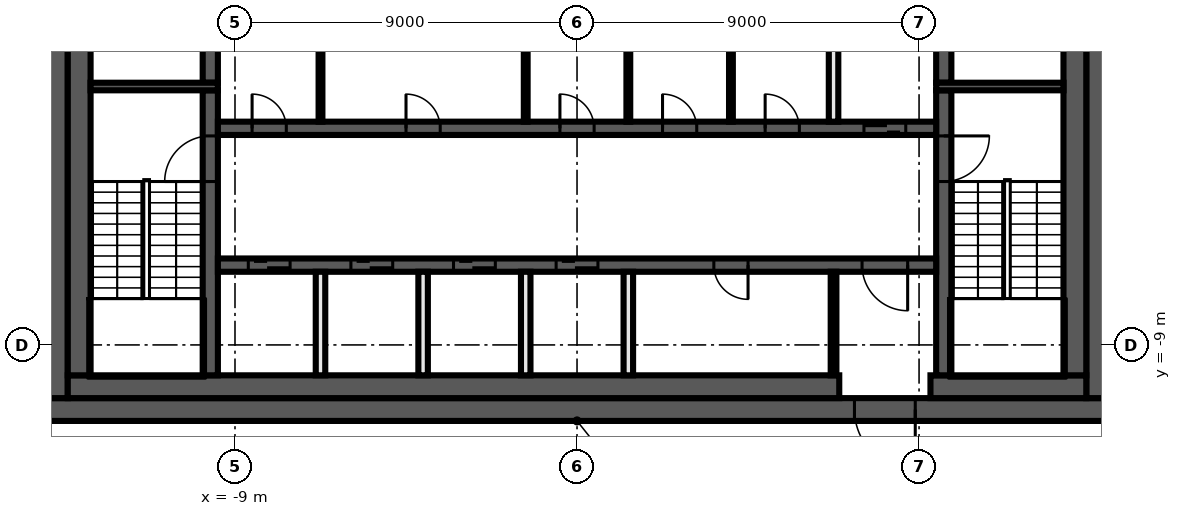
"""IFC4 building model, lengths in metres.
Left out: names, types, materials, properties, quantities, classifications, styles, units other than length and angle.
Written with IfcOpenShell. Run it as: python <this file> out.ifc"""

import sys

from ifc_helpers import new_model, si_unit, direction, frame, frame_2d, origin, place, context, subcontext, project, spatial, rectangle, extrude, element, fill, save


model = new_model("IFC4")
c1 = context("Model", 3, precision=1e-05, world=origin(), true_north=direction((0.0, 1.0)))
c2 = subcontext(c1, "Body", "Model", "MODEL_VIEW")
j1 = project(units=[si_unit("LENGTHUNIT", "METRE"), si_unit("PLANEANGLEUNIT", "RADIAN")], contexts=[c1])
p1 = place(None, origin())
s1 = spatial("IfcSite", under=j1, at=p1, CompositionType="ELEMENT")
p2 = place(p1, origin())
s2 = spatial("IfcBuilding", under=s1, at=p2, CompositionType="ELEMENT")
p3 = place(p2, frame((0.0, 0.0, 298.4)))
s3 = spatial("IfcBuildingStorey", under=s2, at=p3, CompositionType="ELEMENT", Elevation=298.4)
p4 = place(p3, frame((14.0, -10.7, 0.0), z_axis=(0.0, 0.0, 1.0), x_axis=(-1.0, 0.0, 0.0)))
e1 = element("IfcWall", 1, at=p4, inside=s3, PredefinedType="SHEAR", context=c2, shape_type="SweptSolid", body=[
    extrude(rectangle(XDim=28.0, YDim=0.6, at=frame_2d((14.0, 0.0))), origin(), (0.0, 0.0, 1.0), 3.82),
])
p5 = place(p4, frame((5.1, 0.0, 0.0)))
e2 = element("IfcOpeningElement", 2, at=p5, cuts=e1, PredefinedType="OPENING", context=c2, shape_type="SweptSolid", body=[
    extrude(rectangle(XDim=1.6, YDim=2.1, at=frame_2d((0.8, 1.05))), frame((0.0, 0.31, 0.0), z_axis=(0.0, -1.0, 0.0), x_axis=(1.0, 0.0, 0.0)), (0.0, 0.0, 1.0), 0.62),
])
for number, where, z_axis, x_axis in (
    (3, (13.7, 10.4, 0.0), (0.0, 0.0, 1.0), (0.0, -1.0, 0.0)),
    (4, (-13.7, -10.4, 0.0), (0.0, 0.0, 1.0), (0.0, 1.0, 0.0)),
):
    element("IfcWall", number, at=place(p3, frame(where, z_axis=z_axis, x_axis=x_axis)), inside=s3, PredefinedType="SHEAR", context=c2, shape_type="SweptSolid", body=[
        extrude(rectangle(XDim=20.8, YDim=0.6, at=frame_2d((10.4, 0.0))), origin(), (0.0, 0.0, 1.0), 3.82),
    ])
p6 = place(p3, frame((13.4, -10.1, 0.0), z_axis=(0.0, 0.0, 1.0), x_axis=(-1.0, 0.0, 0.0)))
e5 = element("IfcWall", 5, at=p6, inside=s3, PredefinedType="SHEAR", context=c2, shape_type="SweptSolid", body=[
    extrude(rectangle(XDim=4.1, YDim=0.6, at=frame_2d((2.05, 0.0))), origin(), (0.0, 0.0, 1.0), 3.82),
])
p7 = place(p3, frame((6.9, -10.1, 0.0), z_axis=(0.0, 0.0, 1.0), x_axis=(-1.0, 0.0, 0.0)))
e6 = element("IfcWall", 6, at=p7, inside=s3, PredefinedType="SHEAR", context=c2, shape_type="SweptSolid", body=[
    extrude(rectangle(XDim=20.3, YDim=0.6, at=frame_2d((10.15, 0.0))), origin(), (0.0, 0.0, 1.0), 3.82),
])
for number, where, z_axis, x_axis in (
    (7, (13.1, 9.8, 0.0), (0.0, 0.0, 1.0), (0.0, -1.0, 0.0)),
    (8, (-13.1, -9.8, 0.0), (0.0, 0.0, 1.0), (0.0, 1.0, 0.0)),
):
    element("IfcWall", number, at=place(p3, frame(where, z_axis=z_axis, x_axis=x_axis)), inside=s3, PredefinedType="SHEAR", context=c2, shape_type="SweptSolid", body=[
        extrude(rectangle(XDim=19.6, YDim=0.6, at=frame_2d((9.8, 0.0))), origin(), (0.0, 0.0, 1.0), 3.82),
    ])
p8 = place(p3, frame((9.65, -2.3, 0.0), z_axis=(0.0, 0.0, 1.0), x_axis=(0.0, -1.0, 0.0)))
e9 = element("IfcWall", 9, at=p8, inside=s3, PredefinedType="SHEAR", context=c2, shape_type="SweptSolid", body=[
    extrude(rectangle(XDim=7.5, YDim=0.4, at=frame_2d((3.75, 0.0))), origin(), (0.0, 0.0, 1.0), 3.82),
])
p9 = place(p8, frame((1.2, 0.0, 0.0)))
e10 = element("IfcOpeningElement", 10, at=p9, cuts=e9, PredefinedType="OPENING", context=c2, shape_type="SweptSolid", body=[
    extrude(rectangle(XDim=1.2, YDim=2.1, at=frame_2d((0.6, 1.05))), frame((0.0, 0.21, 0.0), z_axis=(0.0, -1.0, 0.0), x_axis=(1.0, 0.0, 0.0)), (0.0, 0.0, 1.0), 0.42),
])
p10 = place(p3, frame((9.65, 2.1, 0.0), z_axis=(0.0, 0.0, 1.0), x_axis=(0.0, -1.0, 0.0)))
e11 = element("IfcWall", 11, at=p10, inside=s3, PredefinedType="SHEAR", context=c2, shape_type="SweptSolid", body=[
    extrude(rectangle(XDim=4.2, YDim=0.4, at=frame_2d((2.1, 0.0))), origin(), (0.0, 0.0, 1.0), 3.82),
])
p11 = place(p10, frame((0.15, 0.0, 0.0)))
e12 = element("IfcOpeningElement", 12, at=p11, cuts=e11, PredefinedType="OPENING", context=c2, shape_type="SweptSolid", body=[
    extrude(rectangle(XDim=0.9, YDim=2.1, at=frame_2d((0.45, 1.05))), frame((0.0, 0.21, 0.0), z_axis=(0.0, -1.0, 0.0), x_axis=(1.0, 0.0, 0.0)), (0.0, 0.0, 1.0), 0.42),
])
p12 = place(p3, frame((-9.65, -9.8, 0.0), z_axis=(0.0, 0.0, 1.0), x_axis=(0.0, 1.0, 0.0)))
e13 = element("IfcWall", 13, at=p12, inside=s3, PredefinedType="SHEAR", context=c2, shape_type="SweptSolid", body=[
    extrude(rectangle(XDim=7.5, YDim=0.4, at=frame_2d((3.75, 0.0))), origin(), (0.0, 0.0, 1.0), 3.82),
])
p13 = place(p12, frame((5.1, 0.0, 0.0)))
e14 = element("IfcOpeningElement", 14, at=p13, cuts=e13, PredefinedType="OPENING", context=c2, shape_type="SweptSolid", body=[
    extrude(rectangle(XDim=1.2, YDim=2.1, at=frame_2d((0.6, 1.05))), frame((0.0, 0.21, 0.0), z_axis=(0.0, -1.0, 0.0), x_axis=(1.0, 0.0, 0.0)), (0.0, 0.0, 1.0), 0.42),
])
p14 = place(p3, frame((-9.65, -2.1, 0.0), z_axis=(0.0, 0.0, 1.0), x_axis=(0.0, 1.0, 0.0)))
e15 = element("IfcWall", 15, at=p14, inside=s3, PredefinedType="SHEAR", context=c2, shape_type="SweptSolid", body=[
    extrude(rectangle(XDim=4.2, YDim=0.4, at=frame_2d((2.1, 0.0))), origin(), (0.0, 0.0, 1.0), 3.82),
])
for number, where, z_axis, x_axis in (
    (16, (9.45, -2.2, 0.0), (0.0, 0.0, 1.0), (1.0, 0.0, 0.0)),
    (17, (-9.45, -2.2, 0.0), (0.0, 0.0, 1.0), (-1.0, 0.0, 0.0)),
):
    element("IfcWall", number, at=place(p3, frame(where, z_axis=z_axis, x_axis=x_axis)), inside=s3, PredefinedType="SHEAR", context=c2, shape_type="SweptSolid", body=[
        extrude(rectangle(XDim=3.35, YDim=0.2, at=frame_2d((1.675, 0.0))), origin(), (0.0, 0.0, 1.0), 3.82),
    ])
p15 = place(p3, frame((-9.45, -3.3, 0.0), z_axis=(0.0, 0.0, 1.0), x_axis=(1.0, 0.0, 0.0)))
e18 = element("IfcWall", 18, at=p15, inside=s3, PredefinedType="SHEAR", context=c2, shape_type="SweptSolid", body=[
    extrude(rectangle(XDim=18.9, YDim=0.35, at=frame_2d((9.45, 0.0))), origin(), (0.0, 0.0, 1.0), 3.82),
])
p16 = place(p15, frame((17.0, 0.0, 0.0)))
e19 = element("IfcOpeningElement", 19, at=p16, cuts=e18, PredefinedType="OPENING", context=c2, shape_type="SweptSolid", body=[
    extrude(rectangle(XDim=1.1, YDim=2.1, at=frame_2d((0.55, 1.05))), frame((0.0, 0.185, 0.0), z_axis=(0.0, -1.0, 0.0), x_axis=(1.0, 0.0, 0.0)), (0.0, 0.0, 1.0), 0.37),
])
p17 = place(p15, frame((0.9, 0.0, 0.0)))
e20 = element("IfcOpeningElement", 20, at=p17, cuts=e18, PredefinedType="OPENING", context=c2, shape_type="SweptSolid", body=[
    extrude(rectangle(XDim=0.9, YDim=2.1, at=frame_2d((0.45, 1.05))), frame((0.0, 0.185, 0.0), z_axis=(0.0, -1.0, 0.0), x_axis=(1.0, 0.0, 0.0)), (0.0, 0.0, 1.0), 0.37),
])
p18 = place(p15, frame((4.95, 0.0, 0.0)))
e21 = element("IfcOpeningElement", 21, at=p18, cuts=e18, PredefinedType="OPENING", context=c2, shape_type="SweptSolid", body=[
    extrude(rectangle(XDim=0.9, YDim=2.1, at=frame_2d((0.45, 1.05))), frame((0.0, 0.185, 0.0), z_axis=(0.0, -1.0, 0.0), x_axis=(1.0, 0.0, 0.0)), (0.0, 0.0, 1.0), 0.37),
])
p19 = place(p15, frame((9.0, 0.0, 0.0)))
e22 = element("IfcOpeningElement", 22, at=p19, cuts=e18, PredefinedType="OPENING", context=c2, shape_type="SweptSolid", body=[
    extrude(rectangle(XDim=0.9, YDim=2.1, at=frame_2d((0.45, 1.05))), frame((0.0, 0.185, 0.0), z_axis=(0.0, -1.0, 0.0), x_axis=(1.0, 0.0, 0.0)), (0.0, 0.0, 1.0), 0.37),
])
p20 = place(p15, frame((11.7, 0.0, 0.0)))
e23 = element("IfcOpeningElement", 23, at=p20, cuts=e18, PredefinedType="OPENING", context=c2, shape_type="SweptSolid", body=[
    extrude(rectangle(XDim=0.9, YDim=2.1, at=frame_2d((0.45, 1.05))), frame((0.0, 0.185, 0.0), z_axis=(0.0, -1.0, 0.0), x_axis=(1.0, 0.0, 0.0)), (0.0, 0.0, 1.0), 0.37),
])
p21 = place(p15, frame((14.4, 0.0, 0.0)))
e24 = element("IfcOpeningElement", 24, at=p21, cuts=e18, PredefinedType="OPENING", context=c2, shape_type="SweptSolid", body=[
    extrude(rectangle(XDim=0.9, YDim=2.1, at=frame_2d((0.45, 1.05))), frame((0.0, 0.185, 0.0), z_axis=(0.0, -1.0, 0.0), x_axis=(1.0, 0.0, 0.0)), (0.0, 0.0, 1.0), 0.37),
])
p22 = place(p3, frame((9.45, -6.9, 0.0), z_axis=(0.0, 0.0, 1.0), x_axis=(-1.0, 0.0, 0.0)))
e25 = element("IfcWall", 25, at=p22, inside=s3, PredefinedType="SHEAR", context=c2, shape_type="SweptSolid", body=[
    extrude(rectangle(XDim=18.9, YDim=0.35, at=frame_2d((9.45, 0.0))), origin(), (0.0, 0.0, 1.0), 3.82),
])
p23 = place(p22, frame((17.0, 0.0, 0.0)))
e26 = element("IfcOpeningElement", 26, at=p23, cuts=e25, PredefinedType="OPENING", context=c2, shape_type="SweptSolid", body=[
    extrude(rectangle(XDim=1.1, YDim=2.1, at=frame_2d((0.55, 1.05))), frame((0.0, 0.185, 0.0), z_axis=(0.0, -1.0, 0.0), x_axis=(1.0, 0.0, 0.0)), (0.0, 0.0, 1.0), 0.37),
])
p24 = place(p22, frame((14.3, 0.0, 0.0)))
e27 = element("IfcOpeningElement", 27, at=p24, cuts=e25, PredefinedType="OPENING", context=c2, shape_type="SweptSolid", body=[
    extrude(rectangle(XDim=1.1, YDim=2.1, at=frame_2d((0.55, 1.05))), frame((0.0, 0.185, 0.0), z_axis=(0.0, -1.0, 0.0), x_axis=(1.0, 0.0, 0.0)), (0.0, 0.0, 1.0), 0.37),
])
p25 = place(p22, frame((11.6, 0.0, 0.0)))
e28 = element("IfcOpeningElement", 28, at=p25, cuts=e25, PredefinedType="OPENING", context=c2, shape_type="SweptSolid", body=[
    extrude(rectangle(XDim=1.1, YDim=2.1, at=frame_2d((0.55, 1.05))), frame((0.0, 0.185, 0.0), z_axis=(0.0, -1.0, 0.0), x_axis=(1.0, 0.0, 0.0)), (0.0, 0.0, 1.0), 0.37),
])
p26 = place(p22, frame((8.9, 0.0, 0.0)))
e29 = element("IfcOpeningElement", 29, at=p26, cuts=e25, PredefinedType="OPENING", context=c2, shape_type="SweptSolid", body=[
    extrude(rectangle(XDim=1.1, YDim=2.1, at=frame_2d((0.55, 1.05))), frame((0.0, 0.185, 0.0), z_axis=(0.0, -1.0, 0.0), x_axis=(1.0, 0.0, 0.0)), (0.0, 0.0, 1.0), 0.37),
])
p27 = place(p22, frame((0.75, 0.0, 0.0)))
e30 = element("IfcOpeningElement", 30, at=p27, cuts=e25, PredefinedType="OPENING", context=c2, shape_type="SweptSolid", body=[
    extrude(rectangle(XDim=1.2, YDim=2.1, at=frame_2d((0.6, 1.05))), frame((0.0, 0.185, 0.0), z_axis=(0.0, -1.0, 0.0), x_axis=(1.0, 0.0, 0.0)), (0.0, 0.0, 1.0), 0.37),
])
p28 = place(p22, frame((4.95, 0.0, 0.0)))
e31 = element("IfcOpeningElement", 31, at=p28, cuts=e25, PredefinedType="OPENING", context=c2, shape_type="SweptSolid", body=[
    extrude(rectangle(XDim=0.9, YDim=2.1, at=frame_2d((0.45, 1.05))), frame((0.0, 0.185, 0.0), z_axis=(0.0, -1.0, 0.0), x_axis=(1.0, 0.0, 0.0)), (0.0, 0.0, 1.0), 0.37),
])
p29 = place(p3, frame((6.75, -9.8, 0.0), z_axis=(0.0, 0.0, 1.0), x_axis=(0.0, 1.0, 0.0)))
e32 = element("IfcWall", 32, at=p29, inside=s3, PredefinedType="PARTITIONING", context=c2, shape_type="SweptSolid", body=[
    extrude(rectangle(XDim=2.725, YDim=0.15, at=frame_2d((1.363, 0.0))), origin(), (0.0, 0.0, 1.0), 3.82),
])
p30 = place(p3, frame((6.75, -3.125, 0.0), z_axis=(0.0, 0.0, 1.0), x_axis=(0.0, 1.0, 0.0)))
e33 = element("IfcWall", 33, at=p30, inside=s3, PredefinedType="SOLIDWALL", context=c2, shape_type="SweptSolid", body=[
    extrude(rectangle(XDim=2.725, YDim=0.25, at=frame_2d((1.363, 0.0))), origin(), (0.0, 0.0, 1.0), 3.82),
])
for number, where, z_axis, x_axis in (
    (34, (4.05, -3.125, 0.0), (0.0, 0.0, 1.0), (0.0, 1.0, 0.0)),
    (35, (1.35, -3.125, 0.0), (0.0, 0.0, 1.0), (0.0, 1.0, 0.0)),
):
    element("IfcWall", number, at=place(p3, frame(where, z_axis=z_axis, x_axis=x_axis)), inside=s3, PredefinedType="PARTITIONING", context=c2, shape_type="SweptSolid", body=[
        extrude(rectangle(XDim=2.725, YDim=0.1, at=frame_2d((1.363, 0.0))), origin(), (0.0, 0.0, 1.0), 3.82),
    ])
p31 = place(p3, frame((1.35, -9.8, 0.0), z_axis=(0.0, 0.0, 1.0), x_axis=(0.0, 1.0, 0.0)))
e36 = element("IfcWall", 36, at=p31, inside=s3, PredefinedType="SOLIDWALL", context=c2, shape_type="SweptSolid", body=[
    extrude(rectangle(XDim=2.725, YDim=0.25, at=frame_2d((1.363, 0.0))), origin(), (0.0, 0.0, 1.0), 3.82),
])
p32 = place(p3, frame((-1.35, -3.125, 0.0), z_axis=(0.0, 0.0, 1.0), x_axis=(0.0, 1.0, 0.0)))
e37 = element("IfcWall", 37, at=p32, inside=s3, PredefinedType="PARTITIONING", context=c2, shape_type="SweptSolid", body=[
    extrude(rectangle(XDim=2.725, YDim=0.1, at=frame_2d((1.363, 0.0))), origin(), (0.0, 0.0, 1.0), 3.82),
])
for number, where, z_axis, x_axis in (
    (38, (-1.35, -9.8, 0.0), (0.0, 0.0, 1.0), (0.0, 1.0, 0.0)),
    (39, (-4.05, -9.8, 0.0), (0.0, 0.0, 1.0), (0.0, 1.0, 0.0)),
):
    element("IfcWall", number, at=place(p3, frame(where, z_axis=z_axis, x_axis=x_axis)), inside=s3, PredefinedType="SOLIDWALL", context=c2, shape_type="SweptSolid", body=[
        extrude(rectangle(XDim=2.725, YDim=0.25, at=frame_2d((1.363, 0.0))), origin(), (0.0, 0.0, 1.0), 3.82),
    ])
p33 = place(p3, frame((-6.75, -3.125, 0.0), z_axis=(0.0, 0.0, 1.0), x_axis=(0.0, 1.0, 0.0)))
e40 = element("IfcWall", 40, at=p33, inside=s3, PredefinedType="PARTITIONING", context=c2, shape_type="SweptSolid", body=[
    extrude(rectangle(XDim=2.725, YDim=0.1, at=frame_2d((1.363, 0.0))), origin(), (0.0, 0.0, 1.0), 3.82),
])
p34 = place(p3, frame((-6.75, -9.8, 0.0), z_axis=(0.0, 0.0, 1.0), x_axis=(0.0, 1.0, 0.0)))
e41 = element("IfcWall", 41, at=p34, inside=s3, PredefinedType="SOLIDWALL", context=c2, shape_type="SweptSolid", body=[
    extrude(rectangle(XDim=2.725, YDim=0.25, at=frame_2d((1.363, 0.0))), origin(), (0.0, 0.0, 1.0), 3.82),
])
p35 = place(p16, origin())
e42 = element("IfcDoor", 42, at=p35, inside=s3, OperationType="DOUBLE_DOOR_SLIDING", PredefinedType="DOOR", context=c2, shape_type="SweptSolid", body=[
    extrude(rectangle(XDim=1.1, YDim=2.1, at=frame_2d((0.55, 1.05))), frame((0.0, 0.025, 0.0), z_axis=(0.0, -1.0, 0.0), x_axis=(1.0, 0.0, 0.0)), (0.0, 0.0, 1.0), 0.05),
])
fill(e19, e42)
p36 = place(p23, origin())
e43 = element("IfcDoor", 43, at=p36, inside=s3, OperationType="DOUBLE_DOOR_SLIDING", PredefinedType="DOOR", context=c2, shape_type="SweptSolid", body=[
    extrude(rectangle(XDim=1.1, YDim=2.1, at=frame_2d((0.55, 1.05))), frame((0.0, 0.025, 0.0), z_axis=(0.0, -1.0, 0.0), x_axis=(1.0, 0.0, 0.0)), (0.0, 0.0, 1.0), 0.05),
])
fill(e26, e43)
p37 = place(p24, origin())
e44 = element("IfcDoor", 44, at=p37, inside=s3, OperationType="DOUBLE_DOOR_SLIDING", PredefinedType="DOOR", context=c2, shape_type="SweptSolid", body=[
    extrude(rectangle(XDim=1.1, YDim=2.1, at=frame_2d((0.55, 1.05))), frame((0.0, 0.025, 0.0), z_axis=(0.0, -1.0, 0.0), x_axis=(1.0, 0.0, 0.0)), (0.0, 0.0, 1.0), 0.05),
])
fill(e27, e44)
p38 = place(p25, origin())
e45 = element("IfcDoor", 45, at=p38, inside=s3, OperationType="DOUBLE_DOOR_SLIDING", PredefinedType="DOOR", context=c2, shape_type="SweptSolid", body=[
    extrude(rectangle(XDim=1.1, YDim=2.1, at=frame_2d((0.55, 1.05))), frame((0.0, 0.025, 0.0), z_axis=(0.0, -1.0, 0.0), x_axis=(1.0, 0.0, 0.0)), (0.0, 0.0, 1.0), 0.05),
])
fill(e28, e45)
p39 = place(p26, origin())
e46 = element("IfcDoor", 46, at=p39, inside=s3, OperationType="DOUBLE_DOOR_SLIDING", PredefinedType="DOOR", context=c2, shape_type="SweptSolid", body=[
    extrude(rectangle(XDim=1.1, YDim=2.1, at=frame_2d((0.55, 1.05))), frame((0.0, 0.025, 0.0), z_axis=(0.0, -1.0, 0.0), x_axis=(1.0, 0.0, 0.0)), (0.0, 0.0, 1.0), 0.05),
])
fill(e29, e46)
p40 = place(p5, origin())
e47 = element("IfcDoor", 47, at=p40, inside=s3, OperationType="DOUBLE_DOOR_SINGLE_SWING", PredefinedType="DOOR", context=c2, shape_type="SweptSolid", body=[
    extrude(rectangle(XDim=1.6, YDim=2.1, at=frame_2d((0.8, 1.05))), frame((0.0, 0.025, 0.0), z_axis=(0.0, -1.0, 0.0), x_axis=(1.0, 0.0, 0.0)), (0.0, 0.0, 1.0), 0.05),
])
fill(e2, e47)
p41 = place(p27, origin())
e48 = element("IfcDoor", 48, at=p41, inside=s3, OperationType="SINGLE_SWING_LEFT", PredefinedType="DOOR", context=c2, shape_type="SweptSolid", body=[
    extrude(rectangle(XDim=1.2, YDim=2.1, at=frame_2d((0.6, 1.05))), frame((0.0, 0.025, 0.0), z_axis=(0.0, -1.0, 0.0), x_axis=(1.0, 0.0, 0.0)), (0.0, 0.0, 1.0), 0.05),
])
fill(e30, e48)
p42 = place(p17, origin())
e49 = element("IfcDoor", 49, at=p42, inside=s3, OperationType="SINGLE_SWING_LEFT", PredefinedType="DOOR", context=c2, shape_type="SweptSolid", body=[
    extrude(rectangle(XDim=0.9, YDim=2.1, at=frame_2d((0.45, 1.05))), frame((0.0, 0.025, 0.0), z_axis=(0.0, -1.0, 0.0), x_axis=(1.0, 0.0, 0.0)), (0.0, 0.0, 1.0), 0.05),
])
fill(e20, e49)
p43 = place(p18, origin())
e50 = element("IfcDoor", 50, at=p43, inside=s3, OperationType="SINGLE_SWING_RIGHT", PredefinedType="DOOR", context=c2, shape_type="SweptSolid", body=[
    extrude(rectangle(XDim=0.9, YDim=2.1, at=frame_2d((0.45, 1.05))), frame((0.0, 0.025, 0.0), z_axis=(0.0, -1.0, 0.0), x_axis=(1.0, 0.0, 0.0)), (0.0, 0.0, 1.0), 0.05),
])
fill(e21, e50)
p44 = place(p19, origin())
e51 = element("IfcDoor", 51, at=p44, inside=s3, OperationType="SINGLE_SWING_LEFT", PredefinedType="DOOR", context=c2, shape_type="SweptSolid", body=[
    extrude(rectangle(XDim=0.9, YDim=2.1, at=frame_2d((0.45, 1.05))), frame((0.0, 0.025, 0.0), z_axis=(0.0, -1.0, 0.0), x_axis=(1.0, 0.0, 0.0)), (0.0, 0.0, 1.0), 0.05),
])
fill(e22, e51)
p45 = place(p20, origin())
e52 = element("IfcDoor", 52, at=p45, inside=s3, OperationType="SINGLE_SWING_RIGHT", PredefinedType="DOOR", context=c2, shape_type="SweptSolid", body=[
    extrude(rectangle(XDim=0.9, YDim=2.1, at=frame_2d((0.45, 1.05))), frame((0.0, 0.025, 0.0), z_axis=(0.0, -1.0, 0.0), x_axis=(1.0, 0.0, 0.0)), (0.0, 0.0, 1.0), 0.05),
])
fill(e23, e52)
p46 = place(p21, origin())
e53 = element("IfcDoor", 53, at=p46, inside=s3, OperationType="SINGLE_SWING_LEFT", PredefinedType="DOOR", context=c2, shape_type="SweptSolid", body=[
    extrude(rectangle(XDim=0.9, YDim=2.1, at=frame_2d((0.45, 1.05))), frame((0.0, 0.025, 0.0), z_axis=(0.0, -1.0, 0.0), x_axis=(1.0, 0.0, 0.0)), (0.0, 0.0, 1.0), 0.05),
])
fill(e24, e53)
p47 = place(p28, origin())
e54 = element("IfcDoor", 54, at=p47, inside=s3, OperationType="SINGLE_SWING_RIGHT", PredefinedType="DOOR", context=c2, shape_type="SweptSolid", body=[
    extrude(rectangle(XDim=0.9, YDim=2.1, at=frame_2d((0.45, 1.05))), frame((0.0, 0.025, 0.0), z_axis=(0.0, -1.0, 0.0), x_axis=(1.0, 0.0, 0.0)), (0.0, 0.0, 1.0), 0.05),
])
fill(e31, e54)
p48 = place(p9, origin())
e55 = element("IfcDoor", 55, at=p48, inside=s3, OperationType="SINGLE_SWING_RIGHT", PredefinedType="DOOR", context=c2, shape_type="SweptSolid", body=[
    extrude(rectangle(XDim=1.2, YDim=2.1, at=frame_2d((0.6, 1.05))), frame((0.0, 0.025, 0.0), z_axis=(0.0, -1.0, 0.0), x_axis=(1.0, 0.0, 0.0)), (0.0, 0.0, 1.0), 0.05),
])
fill(e10, e55)
p49 = place(p13, origin())
e56 = element("IfcDoor", 56, at=p49, inside=s3, OperationType="SINGLE_SWING_LEFT", PredefinedType="DOOR", context=c2, shape_type="SweptSolid", body=[
    extrude(rectangle(XDim=1.2, YDim=2.1, at=frame_2d((0.6, 1.05))), frame((0.0, 0.025, 0.0), z_axis=(0.0, -1.0, 0.0), x_axis=(1.0, 0.0, 0.0)), (0.0, 0.0, 1.0), 0.05),
])
fill(e14, e56)
save(model, sys.argv[1])
